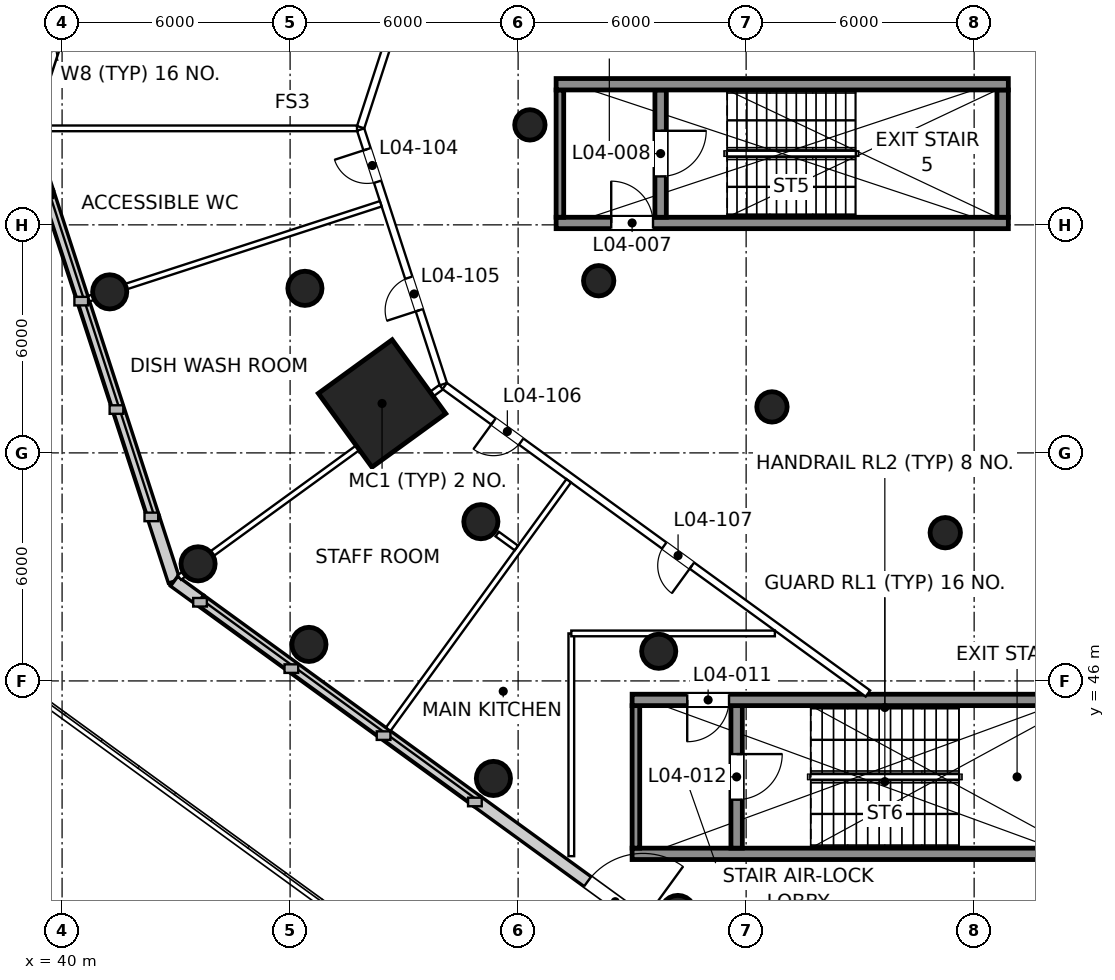
"""IFC4 building model, lengths in metres.
Left out: names, types, materials, properties, quantities, classifications, styles, units other than length and angle.
Written with IfcOpenShell. Run it as: python <this file> out.ifc"""

import sys

from ifc_helpers import new_model, si_unit, direction, frame, frame_2d, origin, origin_2d, place, context, subcontext, project, spatial, rectangle, circle, extrude, element, fill, save


model = new_model("IFC4")
c1 = context("Model", 3, precision=1e-05, world=origin(), true_north=direction((0.0, 1.0)))
c2 = subcontext(c1, "Body", "Model", "MODEL_VIEW")
j1 = project(units=[si_unit("LENGTHUNIT", "METRE"), si_unit("PLANEANGLEUNIT", "RADIAN")], contexts=[c1])
p1 = place(None, origin())
s1 = spatial("IfcSite", under=j1, at=p1, CompositionType="ELEMENT")
p2 = place(p1, origin())
s2 = spatial("IfcBuilding", under=s1, at=p2, CompositionType="ELEMENT")
p3 = place(p2, frame((0.0, 0.0, 29.0)))
s3 = spatial("IfcBuildingStorey", under=s2, at=p3, CompositionType="ELEMENT", Elevation=29.0)
p4 = place(p3, frame((46.39, 56.33, 0.0), z_axis=(0.0, 0.0, 1.0), x_axis=(1.0, 0.0, 0.0)))
e1 = element("IfcColumn", 1, at=p4, inside=s3, PredefinedType="COLUMN", context=c2, shape_type="SweptSolid", body=[
    extrude(circle(Radius=0.45, at=origin_2d()), origin(), (0.0, 0.0, 1.0), 5.0),
])
p5 = place(p3, frame((48.42, 53.3, 0.0), z_axis=(0.0, 0.0, 1.0), x_axis=(-0.809016994375, -0.587785252292, 0.0)))
e2 = element("IfcColumn", 2, at=p5, inside=s3, PredefinedType="COLUMN", context=c2, shape_type="SweptSolid", body=[
    extrude(rectangle(XDim=2.4, YDim=2.4, at=origin_2d()), origin(), (0.0, 0.0, 1.0), 5.0),
])
for number, where, z_axis, x_axis in (
    (3, (51.02, 50.19, 0.0), (0.0, 0.0, 1.0), (1.0, 0.0, 0.0)),
    (4, (55.7, 46.78, 0.0), (0.0, 0.0, 1.0), (1.0, 0.0, 0.0)),
):
    element("IfcColumn", number, at=place(p3, frame(where, z_axis=z_axis, x_axis=x_axis)), inside=s3, PredefinedType="COLUMN", context=c2, shape_type="SweptSolid", body=[
        extrude(circle(Radius=0.45, at=origin_2d()), origin(), (0.0, 0.0, 1.0), 5.0),
    ])
for number, where, z_axis, x_axis in (
    (5, (52.31, 60.63, 0.0), (0.0, 0.0, 1.0), (1.0, 0.0, 0.0)),
    (6, (54.12, 56.53, 0.0), (0.0, 0.0, 1.0), (1.0, 0.0, 0.0)),
    (7, (58.68, 53.21, 0.0), (0.0, 0.0, 1.0), (1.0, 0.0, 0.0)),
    (8, (63.24, 49.9, 0.0), (0.0, 0.0, 1.0), (1.0, 0.0, 0.0)),
):
    element("IfcColumn", number, at=place(p3, frame(where, z_axis=z_axis, x_axis=x_axis)), inside=s3, PredefinedType="COLUMN", context=c2, shape_type="SweptSolid", body=[
        extrude(circle(Radius=0.4, at=origin_2d()), origin(), (0.0, 0.0, 1.0), 5.0),
    ])
for number, where, z_axis, x_axis in (
    (9, (41.253, 56.237, 0.0), (0.0, 0.0, 1.0), (1.0, 0.0, 0.0)),
    (10, (43.578, 49.081, 0.0), (0.0, 0.0, 1.0), (1.0, 0.0, 0.0)),
    (11, (46.496, 46.961, 0.0), (0.0, 0.0, 1.0), (1.0, 0.0, 0.0)),
    (12, (51.35, 43.434, 0.0), (0.0, 0.0, 1.0), (1.0, 0.0, 0.0)),
    (13, (56.204, 39.908, 0.0), (0.0, 0.0, 1.0), (1.0, 0.0, 0.0)),
):
    element("IfcColumn", number, at=place(p3, frame(where, z_axis=z_axis, x_axis=x_axis)), inside=s3, PredefinedType="COLUMN", context=c2, shape_type="SweptSolid", body=[
        extrude(circle(Radius=0.45, at=origin_2d()), origin(), (0.0, 0.0, 1.0), 5.0),
    ])
p6 = place(p3, frame((39.077, 60.539, 0.0), z_axis=(0.0, 0.0, 1.0), x_axis=(0.309036002497, -0.951050339972, 0.0)))
e14 = element("IfcWall", 14, at=p6, inside=s3, PredefinedType="SOLIDWALL", context=c2, shape_type="SweptSolid", body=[
    extrude(rectangle(XDim=1.764, YDim=0.32, at=frame_2d((0.882, 0.0))), origin(), (0.0, 0.0, 1.0), 4.65),
])
p7 = place(p3, frame((39.622, 58.861, 0.0), z_axis=(0.0, 0.0, 1.0), x_axis=(0.309000197986, -0.951061973609, 0.0)))
e15 = element("IfcWall", 15, at=p7, inside=s3, PredefinedType="SOLIDWALL", context=c2, shape_type="SweptSolid", body=[
    extrude(rectangle(XDim=9.0, YDim=0.32, at=frame_2d((4.5, 0.0))), origin(), (0.0, 0.0, 1.0), 0.9),
])
p8 = place(p3, frame((42.403, 50.302, 0.0), z_axis=(0.0, 0.0, 1.0), x_axis=(0.308995332064, -0.951063554534, 0.0)))
e16 = element("IfcWall", 16, at=p8, inside=s3, PredefinedType="SOLIDWALL", context=c2, shape_type="SweptSolid", body=[
    extrude(rectangle(XDim=1.764, YDim=0.32, at=frame_2d((0.882, 0.0))), origin(), (0.0, 0.0, 1.0), 4.65),
])
p9 = place(p3, frame((42.948, 48.624, 0.0), z_axis=(0.0, 0.0, 1.0), x_axis=(0.809172006105, -0.587571837766, 0.0)))
e17 = element("IfcWall", 17, at=p9, inside=s3, PredefinedType="SOLIDWALL", context=c2, shape_type="SweptSolid", body=[
    extrude(rectangle(XDim=0.847, YDim=0.32, at=frame_2d((0.424, 0.0))), origin(), (0.0, 0.0, 1.0), 4.65),
])
p10 = place(p3, frame((43.634, 48.126, 0.0), z_axis=(0.0, 0.0, 1.0), x_axis=(0.808999938455, -0.587808727036, 0.0)))
e18 = element("IfcWall", 18, at=p10, inside=s3, PredefinedType="SOLIDWALL", context=c2, shape_type="SweptSolid", body=[
    extrude(rectangle(XDim=9.0, YDim=0.32, at=frame_2d((4.5, 0.0))), origin(), (0.0, 0.0, 1.0), 0.9),
])
p11 = place(p3, frame((50.915, 42.836, 0.0), z_axis=(0.0, 0.0, 1.0), x_axis=(0.809022210299, -0.587778073121, 0.0)))
e19 = element("IfcWall", 19, at=p11, inside=s3, PredefinedType="SOLIDWALL", context=c2, shape_type="SweptSolid", body=[
    extrude(rectangle(XDim=9.0, YDim=0.32, at=frame_2d((4.5, 0.0))), origin(), (0.0, 0.0, 1.0), 4.65),
])
p12 = place(p11, frame((3.6, 0.0, 0.0)))
e20 = element("IfcOpeningElement", 20, at=p12, cuts=e19, PredefinedType="OPENING", context=c2, shape_type="SweptSolid", body=[
    extrude(rectangle(XDim=1.8, YDim=2.4, at=frame_2d((0.9, 1.2))), frame((0.0, 0.17, 0.0), z_axis=(0.0, -1.0, 0.0), x_axis=(1.0, 0.0, 0.0)), (0.0, 0.0, 1.0), 0.34),
])
p13 = place(p3, frame((44.669, 77.751, 0.0), z_axis=(0.0, 0.0, 1.0), x_axis=(-0.309010726546, -0.951058552813, 0.0)))
e21 = element("IfcWall", 21, at=p13, inside=s3, PredefinedType="SOLIDWALL", context=c2, shape_type="SweptSolid", body=[
    extrude(rectangle(XDim=18.097, YDim=0.32, at=frame_2d((9.049, 0.0))), origin(), (0.0, 0.0, 1.0), 4.65),
])
p14 = place(p13, frame((2.85, 0.0, 0.9)))
e22 = element("IfcOpeningElement", 22, at=p14, cuts=e21, PredefinedType="OPENING", context=c2, shape_type="SweptSolid", body=[
    extrude(rectangle(XDim=1.8, YDim=2.1, at=frame_2d((0.9, 1.05))), frame((0.0, 0.17, 0.0), z_axis=(0.0, -1.0, 0.0), x_axis=(1.0, 0.0, 0.0)), (0.0, 0.0, 1.0), 0.34),
])
p15 = place(p13, frame((5.85, 0.0, 0.9)))
e23 = element("IfcOpeningElement", 23, at=p15, cuts=e21, PredefinedType="OPENING", context=c2, shape_type="SweptSolid", body=[
    extrude(rectangle(XDim=1.8, YDim=2.1, at=frame_2d((0.9, 1.05))), frame((0.0, 0.17, 0.0), z_axis=(0.0, -1.0, 0.0), x_axis=(1.0, 0.0, 0.0)), (0.0, 0.0, 1.0), 0.34),
])
p16 = place(p13, frame((8.85, 0.0, 0.9)))
e24 = element("IfcOpeningElement", 24, at=p16, cuts=e21, PredefinedType="OPENING", context=c2, shape_type="SweptSolid", body=[
    extrude(rectangle(XDim=1.8, YDim=2.1, at=frame_2d((0.9, 1.05))), frame((0.0, 0.17, 0.0), z_axis=(0.0, -1.0, 0.0), x_axis=(1.0, 0.0, 0.0)), (0.0, 0.0, 1.0), 0.34),
])
p17 = place(p13, frame((11.85, 0.0, 0.9)))
e25 = element("IfcOpeningElement", 25, at=p17, cuts=e21, PredefinedType="OPENING", context=c2, shape_type="SweptSolid", body=[
    extrude(rectangle(XDim=1.8, YDim=2.1, at=frame_2d((0.9, 1.05))), frame((0.0, 0.17, 0.0), z_axis=(0.0, -1.0, 0.0), x_axis=(1.0, 0.0, 0.0)), (0.0, 0.0, 1.0), 0.34),
])
p18 = place(p13, frame((14.85, 0.0, 0.9)))
e26 = element("IfcOpeningElement", 26, at=p18, cuts=e21, PredefinedType="OPENING", context=c2, shape_type="SweptSolid", body=[
    extrude(rectangle(XDim=1.8, YDim=2.1, at=frame_2d((0.9, 1.05))), frame((0.0, 0.17, 0.0), z_axis=(0.0, -1.0, 0.0), x_axis=(1.0, 0.0, 0.0)), (0.0, 0.0, 1.0), 0.34),
])
p19 = place(p3, frame((55.0, 41.45, 0.0), z_axis=(0.0, 0.0, 1.0), x_axis=(1.0, 0.0, 0.0)))
e27 = element("IfcWall", 27, at=p19, inside=s3, PredefinedType="SHEAR", context=c2, shape_type="SweptSolid", body=[
    extrude(rectangle(XDim=11.9, YDim=0.3, at=frame_2d((5.95, 0.0))), origin(), (0.0, 0.0, 1.0), 5.0),
])
p20 = place(p3, frame((55.1, 41.6, 0.0), z_axis=(0.0, 0.0, 1.0), x_axis=(0.0, 1.0, 0.0)))
e28 = element("IfcWall", 28, at=p20, inside=s3, PredefinedType="SHEAR", context=c2, shape_type="SweptSolid", body=[
    extrude(rectangle(XDim=3.75, YDim=0.2, at=frame_2d((1.875, 0.0))), origin(), (0.0, 0.0, 1.0), 5.0),
])
p21 = place(p3, frame((57.75, 41.6, 0.0), z_axis=(0.0, 0.0, 1.0), x_axis=(0.0, 1.0, 0.0)))
e29 = element("IfcWall", 29, at=p21, inside=s3, PredefinedType="SHEAR", context=c2, shape_type="SweptSolid", body=[
    extrude(rectangle(XDim=3.75, YDim=0.3, at=frame_2d((1.875, 0.0))), origin(), (0.0, 0.0, 1.0), 5.0),
])
p22 = place(p21, frame((1.275, 0.0, 0.0)))
e30 = element("IfcOpeningElement", 30, at=p22, cuts=e29, PredefinedType="OPENING", context=c2, shape_type="SweptSolid", body=[
    extrude(rectangle(XDim=1.2, YDim=2.1, at=frame_2d((0.6, 1.05))), frame((0.0, 0.16, 0.0), z_axis=(0.0, -1.0, 0.0), x_axis=(1.0, 0.0, 0.0)), (0.0, 0.0, 1.0), 0.32),
])
p23 = place(p3, frame((55.0, 45.5, 0.0), z_axis=(0.0, 0.0, 1.0), x_axis=(1.0, 0.0, 0.0)))
e31 = element("IfcWall", 31, at=p23, inside=s3, PredefinedType="SHEAR", context=c2, shape_type="SweptSolid", body=[
    extrude(rectangle(XDim=11.9, YDim=0.3, at=frame_2d((5.95, 0.0))), origin(), (0.0, 0.0, 1.0), 5.0),
])
p24 = place(p23, frame((1.45, 0.0, 0.0)))
e32 = element("IfcOpeningElement", 32, at=p24, cuts=e31, PredefinedType="OPENING", context=c2, shape_type="SweptSolid", body=[
    extrude(rectangle(XDim=1.1, YDim=2.1, at=frame_2d((0.55, 1.05))), frame((0.0, 0.16, 0.0), z_axis=(0.0, -1.0, 0.0), x_axis=(1.0, 0.0, 0.0)), (0.0, 0.0, 1.0), 0.32),
])
p25 = place(p3, frame((53.0, 58.05, 0.0), z_axis=(0.0, 0.0, 1.0), x_axis=(1.0, 0.0, 0.0)))
e33 = element("IfcWall", 33, at=p25, inside=s3, PredefinedType="SHEAR", context=c2, shape_type="SweptSolid", body=[
    extrude(rectangle(XDim=11.9, YDim=0.3, at=frame_2d((5.95, 0.0))), origin(), (0.0, 0.0, 1.0), 5.0),
])
p26 = place(p25, frame((1.45, 0.0, 0.0)))
e34 = element("IfcOpeningElement", 34, at=p26, cuts=e33, PredefinedType="OPENING", context=c2, shape_type="SweptSolid", body=[
    extrude(rectangle(XDim=1.1, YDim=2.1, at=frame_2d((0.55, 1.05))), frame((0.0, 0.16, 0.0), z_axis=(0.0, -1.0, 0.0), x_axis=(1.0, 0.0, 0.0)), (0.0, 0.0, 1.0), 0.32),
])
p27 = place(p3, frame((53.1, 58.2, 0.0), z_axis=(0.0, 0.0, 1.0), x_axis=(0.0, 1.0, 0.0)))
e35 = element("IfcWall", 35, at=p27, inside=s3, PredefinedType="SHEAR", context=c2, shape_type="SweptSolid", body=[
    extrude(rectangle(XDim=3.35, YDim=0.2, at=frame_2d((1.675, 0.0))), origin(), (0.0, 0.0, 1.0), 5.0),
])
p28 = place(p3, frame((55.75, 58.2, 0.0), z_axis=(0.0, 0.0, 1.0), x_axis=(0.0, 1.0, 0.0)))
e36 = element("IfcWall", 36, at=p28, inside=s3, PredefinedType="SHEAR", context=c2, shape_type="SweptSolid", body=[
    extrude(rectangle(XDim=3.35, YDim=0.3, at=frame_2d((1.675, 0.0))), origin(), (0.0, 0.0, 1.0), 5.0),
])
p29 = place(p28, frame((1.075, 0.0, 0.0)))
e37 = element("IfcOpeningElement", 37, at=p29, cuts=e36, PredefinedType="OPENING", context=c2, shape_type="SweptSolid", body=[
    extrude(rectangle(XDim=1.2, YDim=2.1, at=frame_2d((0.6, 1.05))), frame((0.0, 0.16, 0.0), z_axis=(0.0, -1.0, 0.0), x_axis=(1.0, 0.0, 0.0)), (0.0, 0.0, 1.0), 0.32),
])
p30 = place(p3, frame((64.75, 58.2, 0.0), z_axis=(0.0, 0.0, 1.0), x_axis=(0.0, 1.0, 0.0)))
e38 = element("IfcWall", 38, at=p30, inside=s3, PredefinedType="SHEAR", context=c2, shape_type="SweptSolid", body=[
    extrude(rectangle(XDim=3.35, YDim=0.3, at=frame_2d((1.675, 0.0))), origin(), (0.0, 0.0, 1.0), 5.0),
])
p31 = place(p3, frame((53.0, 61.7, 0.0), z_axis=(0.0, 0.0, 1.0), x_axis=(1.0, 0.0, 0.0)))
e39 = element("IfcWall", 39, at=p31, inside=s3, PredefinedType="SHEAR", context=c2, shape_type="SweptSolid", body=[
    extrude(rectangle(XDim=11.9, YDim=0.3, at=frame_2d((5.95, 0.0))), origin(), (0.0, 0.0, 1.0), 5.0),
])
p32 = place(p3, frame((61.204, 45.669, 0.0), z_axis=(0.0, 0.0, 1.0), x_axis=(-0.809024401628, 0.587775056948, 0.0)))
e40 = element("IfcWall", 40, at=p32, inside=s3, PredefinedType="PARTITIONING", context=c2, shape_type="SweptSolid", body=[
    extrude(rectangle(XDim=13.763, YDim=0.2, at=frame_2d((6.882, 0.0))), origin(), (0.0, 0.0, 1.0), 4.65),
])
p33 = place(p32, frame((11.277, 0.0, 0.0)))
e41 = element("IfcOpeningElement", 41, at=p33, cuts=e40, PredefinedType="OPENING", context=c2, shape_type="SweptSolid", body=[
    extrude(rectangle(XDim=0.9, YDim=2.1, at=frame_2d((0.45, 1.05))), frame((0.0, 0.11, 0.0), z_axis=(0.0, -1.0, 0.0), x_axis=(1.0, 0.0, 0.0)), (0.0, 0.0, 1.0), 0.22),
])
p34 = place(p32, frame((5.724, 0.0, 0.0)))
e42 = element("IfcOpeningElement", 42, at=p34, cuts=e40, PredefinedType="OPENING", context=c2, shape_type="SweptSolid", body=[
    extrude(rectangle(XDim=0.9, YDim=2.1, at=frame_2d((0.45, 1.05))), frame((0.0, 0.11, 0.0), z_axis=(0.0, -1.0, 0.0), x_axis=(1.0, 0.0, 0.0)), (0.0, 0.0, 1.0), 0.22),
])
p35 = place(p3, frame((50.033, 53.809, 0.0), z_axis=(0.0, 0.0, 1.0), x_axis=(-0.309023375149, 0.951054443032, 0.0)))
e43 = element("IfcWall", 43, at=p35, inside=s3, PredefinedType="PARTITIONING", context=c2, shape_type="SweptSolid", body=[
    extrude(rectangle(XDim=7.044, YDim=0.2, at=frame_2d((3.522, 0.0))), origin(), (0.0, 0.0, 1.0), 4.65),
])
p36 = place(p35, frame((5.599, 0.0, 0.0)))
e44 = element("IfcOpeningElement", 44, at=p36, cuts=e43, PredefinedType="OPENING", context=c2, shape_type="SweptSolid", body=[
    extrude(rectangle(XDim=0.9, YDim=2.1, at=frame_2d((0.45, 1.05))), frame((0.0, 0.11, 0.0), z_axis=(0.0, -1.0, 0.0), x_axis=(1.0, 0.0, 0.0)), (0.0, 0.0, 1.0), 0.22),
])
p37 = place(p35, frame((2.045, 0.0, 0.0)))
e45 = element("IfcOpeningElement", 45, at=p37, cuts=e43, PredefinedType="OPENING", context=c2, shape_type="SweptSolid", body=[
    extrude(rectangle(XDim=0.9, YDim=2.1, at=frame_2d((0.45, 1.05))), frame((0.0, 0.11, 0.0), z_axis=(0.0, -1.0, 0.0), x_axis=(1.0, 0.0, 0.0)), (0.0, 0.0, 1.0), 0.22),
])
p38 = place(p3, frame((47.856, 60.57, 0.0), z_axis=(0.0, 0.0, 1.0), x_axis=(0.309027605618, 0.951053068428, 0.0)))
e46 = element("IfcWall", 46, at=p38, inside=s3, PredefinedType="PARTITIONING", context=c2, shape_type="SweptSolid", body=[
    extrude(rectangle(XDim=15.013, YDim=0.2, at=frame_2d((7.506, 0.0))), origin(), (0.0, 0.0, 1.0), 4.65),
])
p39 = place(p38, frame((12.655, 0.0, 0.0)))
e47 = element("IfcOpeningElement", 47, at=p39, cuts=e46, PredefinedType="OPENING", context=c2, shape_type="SweptSolid", body=[
    extrude(rectangle(XDim=0.9, YDim=2.1, at=frame_2d((0.45, 1.05))), frame((0.0, 0.11, 0.0), z_axis=(0.0, -1.0, 0.0), x_axis=(1.0, 0.0, 0.0)), (0.0, 0.0, 1.0), 0.22),
])
p40 = place(p38, frame((4.586, 0.0, 0.0)))
e48 = element("IfcOpeningElement", 48, at=p40, cuts=e46, PredefinedType="OPENING", context=c2, shape_type="SweptSolid", body=[
    extrude(rectangle(XDim=0.9, YDim=2.1, at=frame_2d((0.45, 1.05))), frame((0.0, 0.11, 0.0), z_axis=(0.0, -1.0, 0.0), x_axis=(1.0, 0.0, 0.0)), (0.0, 0.0, 1.0), 0.22),
])
p41 = place(p3, frame((39.245, 60.539, 0.0), z_axis=(0.0, 0.0, 1.0), x_axis=(1.0, 0.0, 0.0)))
e49 = element("IfcWall", 49, at=p41, inside=s3, PredefinedType="PARTITIONING", context=c2, shape_type="SweptSolid", body=[
    extrude(rectangle(XDim=8.516, YDim=0.15, at=frame_2d((4.258, 0.0))), origin(), (0.0, 0.0, 1.0), 3.75),
])
p42 = place(p3, frame((43.085, 48.723, 0.0), z_axis=(0.0, 0.0, 1.0), x_axis=(0.809007500309, 0.587798319531, 0.0)))
e50 = element("IfcWall", 50, at=p42, inside=s3, PredefinedType="PARTITIONING", context=c2, shape_type="SweptSolid", body=[
    extrude(rectangle(XDim=8.516, YDim=0.15, at=frame_2d((4.258, 0.0))), origin(), (0.0, 0.0, 1.0), 4.65),
])
p43 = place(p3, frame((40.701, 56.058, 0.0), z_axis=(0.0, 0.0, 1.0), x_axis=(0.951058046839, 0.309012283804, 0.0)))
e51 = element("IfcWall", 51, at=p43, inside=s3, PredefinedType="PARTITIONING", context=c2, shape_type="SweptSolid", body=[
    extrude(rectangle(XDim=8.08, YDim=0.15, at=frame_2d((4.04, 0.0))), origin(), (0.0, 0.0, 1.0), 3.75),
])
p44 = place(p3, frame((48.582, 44.729, 0.0), z_axis=(0.0, 0.0, 1.0), x_axis=(0.587781767955, 0.809019525883, 0.0)))
e52 = element("IfcWall", 52, at=p44, inside=s3, PredefinedType="PARTITIONING", context=c2, shape_type="SweptSolid", body=[
    extrude(rectangle(XDim=8.08, YDim=0.15, at=frame_2d((4.04, 0.0))), origin(), (0.0, 0.0, 1.0), 3.95),
])
p45 = place(p3, frame((51.45, 49.864, 0.0), z_axis=(0.0, 0.0, 1.0), x_axis=(0.808939414815, -0.587892016581, 0.0)))
e53 = element("IfcWall", 53, at=p45, inside=s3, PredefinedType="PARTITIONING", context=c2, shape_type="SweptSolid", body=[
    extrude(rectangle(XDim=0.623, YDim=0.15, at=frame_2d((0.312, 0.0))), origin(), (0.0, 0.0, 1.0), 3.95),
])
p46 = place(p3, frame((53.4, 47.25, 0.0), z_axis=(0.0, 0.0, 1.0), x_axis=(0.0, -1.0, 0.0)))
e54 = element("IfcWall", 54, at=p46, inside=s3, PredefinedType="PARTITIONING", context=c2, shape_type="SweptSolid", body=[
    extrude(rectangle(XDim=5.861, YDim=0.15, at=frame_2d((2.931, 0.0))), origin(), (0.0, 0.0, 1.0), 3.95),
])
p47 = place(p3, frame((58.756, 47.25, 0.0), z_axis=(0.0, 0.0, 1.0), x_axis=(-1.0, 0.0, 0.0)))
e55 = element("IfcWall", 55, at=p47, inside=s3, PredefinedType="PARTITIONING", context=c2, shape_type="SweptSolid", body=[
    extrude(rectangle(XDim=5.356, YDim=0.15, at=frame_2d((2.678, 0.0))), origin(), (0.0, 0.0, 1.0), 3.95),
])
p48 = place(p12, origin())
e56 = element("IfcDoor", 56, at=p48, inside=s3, OperationType="DOUBLE_DOOR_DOUBLE_SWING", PredefinedType="DOOR", context=c2, shape_type="SweptSolid", body=[
    extrude(rectangle(XDim=1.8, YDim=2.4, at=frame_2d((0.9, 1.2))), frame((0.0, 0.04, 0.0), z_axis=(0.0, -1.0, 0.0), x_axis=(1.0, 0.0, 0.0)), (0.0, 0.0, 1.0), 0.05),
])
fill(e20, e56)
p49 = place(p18, origin())
e57 = element("IfcWindow", 57, at=p49, inside=s3, PartitioningType="SINGLE_PANEL", PredefinedType="WINDOW", context=c2, shape_type="SweptSolid", body=[
    extrude(rectangle(XDim=1.8, YDim=2.1, at=frame_2d((0.9, 1.05))), frame((0.0, 0.07, 0.0), z_axis=(0.0, -1.0, 0.0), x_axis=(1.0, 0.0, 0.0)), (0.0, 0.0, 1.0), 0.06),
])
fill(e26, e57)
p50 = place(p26, origin())
e58 = element("IfcDoor", 58, at=p50, inside=s3, OperationType="SINGLE_SWING_LEFT", PredefinedType="DOOR", context=c2, shape_type="SweptSolid", body=[
    extrude(rectangle(XDim=1.1, YDim=2.1, at=frame_2d((0.55, 1.05))), frame((0.0, 0.025, 0.0), z_axis=(0.0, -1.0, 0.0), x_axis=(1.0, 0.0, 0.0)), (0.0, 0.0, 1.0), 0.05),
])
fill(e34, e58)
p51 = place(p29, frame((1.2, 0.0, 0.0), z_axis=(0.0, 0.0, 1.0), x_axis=(-1.0, 0.0, 0.0)))
e59 = element("IfcDoor", 59, at=p51, inside=s3, OperationType="SINGLE_SWING_LEFT", PredefinedType="DOOR", context=c2, shape_type="SweptSolid", body=[
    extrude(rectangle(XDim=1.2, YDim=2.1, at=frame_2d((0.6, 1.05))), frame((0.0, 0.025, 0.0), z_axis=(0.0, -1.0, 0.0), x_axis=(1.0, 0.0, 0.0)), (0.0, 0.0, 1.0), 0.05),
])
fill(e37, e59)
p52 = place(p24, frame((1.1, 0.0, 0.0), z_axis=(0.0, 0.0, 1.0), x_axis=(-1.0, 0.0, 0.0)))
e60 = element("IfcDoor", 60, at=p52, inside=s3, OperationType="SINGLE_SWING_RIGHT", PredefinedType="DOOR", context=c2, shape_type="SweptSolid", body=[
    extrude(rectangle(XDim=1.1, YDim=2.1, at=frame_2d((0.55, 1.05))), frame((0.0, 0.025, 0.0), z_axis=(0.0, -1.0, 0.0), x_axis=(1.0, 0.0, 0.0)), (0.0, 0.0, 1.0), 0.05),
])
fill(e32, e60)
p53 = place(p22, frame((1.2, 0.0, 0.0), z_axis=(0.0, 0.0, 1.0), x_axis=(-1.0, 0.0, 0.0)))
e61 = element("IfcDoor", 61, at=p53, inside=s3, OperationType="SINGLE_SWING_LEFT", PredefinedType="DOOR", context=c2, shape_type="SweptSolid", body=[
    extrude(rectangle(XDim=1.2, YDim=2.1, at=frame_2d((0.6, 1.05))), frame((0.0, 0.025, 0.0), z_axis=(0.0, -1.0, 0.0), x_axis=(1.0, 0.0, 0.0)), (0.0, 0.0, 1.0), 0.05),
])
fill(e30, e61)
p54 = place(p36, origin())
e62 = element("IfcDoor", 62, at=p54, inside=s3, OperationType="SINGLE_SWING_RIGHT", PredefinedType="DOOR", context=c2, shape_type="SweptSolid", body=[
    extrude(rectangle(XDim=0.9, YDim=2.1, at=frame_2d((0.45, 1.05))), frame((0.0, 0.025, 0.0), z_axis=(0.0, -1.0, 0.0), x_axis=(1.0, 0.0, 0.0)), (0.0, 0.0, 1.0), 0.05),
])
fill(e44, e62)
p55 = place(p37, origin())
e63 = element("IfcDoor", 63, at=p55, inside=s3, OperationType="SINGLE_SWING_LEFT", PredefinedType="DOOR", context=c2, shape_type="SweptSolid", body=[
    extrude(rectangle(XDim=0.9, YDim=2.1, at=frame_2d((0.45, 1.05))), frame((0.0, 0.025, 0.0), z_axis=(0.0, -1.0, 0.0), x_axis=(1.0, 0.0, 0.0)), (0.0, 0.0, 1.0), 0.05),
])
fill(e45, e63)
p56 = place(p33, origin())
e64 = element("IfcDoor", 64, at=p56, inside=s3, OperationType="SINGLE_SWING_RIGHT", PredefinedType="DOOR", context=c2, shape_type="SweptSolid", body=[
    extrude(rectangle(XDim=0.9, YDim=2.1, at=frame_2d((0.45, 1.05))), frame((0.0, 0.025, 0.0), z_axis=(0.0, -1.0, 0.0), x_axis=(1.0, 0.0, 0.0)), (0.0, 0.0, 1.0), 0.05),
])
fill(e41, e64)
p57 = place(p34, origin())
e65 = element("IfcDoor", 65, at=p57, inside=s3, OperationType="SINGLE_SWING_LEFT", PredefinedType="DOOR", context=c2, shape_type="SweptSolid", body=[
    extrude(rectangle(XDim=0.9, YDim=2.1, at=frame_2d((0.45, 1.05))), frame((0.0, 0.025, 0.0), z_axis=(0.0, -1.0, 0.0), x_axis=(1.0, 0.0, 0.0)), (0.0, 0.0, 1.0), 0.05),
])
fill(e42, e65)
save(model, sys.argv[1])
